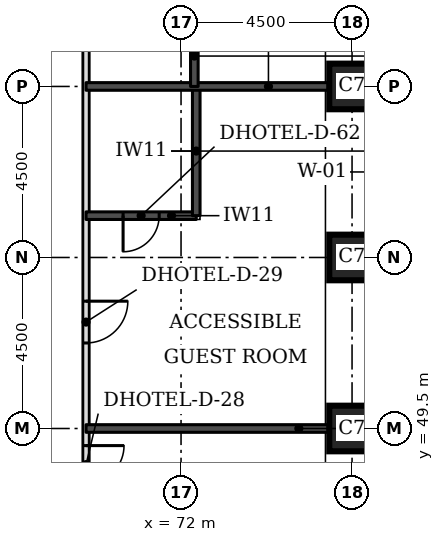
"""IFC4 building model, lengths in metres.
Left out: names, types, materials, properties, quantities, classifications, styles, units other than length and angle.
Written with IfcOpenShell. Run it as: python <this file> out.ifc"""

import sys

from ifc_helpers import new_model, si_unit, direction, frame, frame_2d, origin, origin_2d, place, context, subcontext, project, spatial, rectangle, extrude, element, fill, save


model = new_model("IFC4")
c1 = context("Model", 3, precision=1e-05, world=origin(), true_north=direction((0.0, 1.0)))
c2 = subcontext(c1, "Body", "Model", "MODEL_VIEW")
j1 = project(units=[si_unit("LENGTHUNIT", "METRE"), si_unit("PLANEANGLEUNIT", "RADIAN")], contexts=[c1])
p1 = place(None, origin())
s1 = spatial("IfcSite", under=j1, at=p1, CompositionType="ELEMENT")
p2 = place(p1, origin())
s2 = spatial("IfcBuilding", under=s1, at=p2, CompositionType="ELEMENT")
p3 = place(p2, frame((0.0, 0.0, 36.3)))
s3 = spatial("IfcBuildingStorey", under=s2, at=p3, CompositionType="ELEMENT", Elevation=36.3)
for number, where, z_axis, x_axis in (
    (1, (76.5, 49.5, 0.0), (0.0, 0.0, 1.0), (1.0, 0.0, 0.0)),
    (2, (76.5, 54.0, 0.0), (0.0, 0.0, 1.0), (1.0, 0.0, 0.0)),
    (3, (76.5, 58.5, 0.0), (0.0, 0.0, 1.0), (1.0, 0.0, 0.0)),
):
    element("IfcColumn", number, at=place(p3, frame(where, z_axis=z_axis, x_axis=x_axis)), inside=s3, PredefinedType="COLUMN", context=c2, shape_type="SweptSolid", body=[
        extrude(rectangle(XDim=1.2, YDim=1.2, at=origin_2d()), origin(), (0.0, 0.0, 1.0), 3.3),
    ])
p4 = place(p3, frame((69.5, 47.5, 0.0), z_axis=(0.0, 0.0, 1.0), x_axis=(0.0, 1.0, 0.0)))
e4 = element("IfcWall", 4, at=p4, inside=s3, PredefinedType="PARTITIONING", context=c2, shape_type="SweptSolid", body=[
    extrude(rectangle(XDim=26.5, YDim=0.15, at=frame_2d((13.25, 0.0))), origin(), (0.0, 0.0, 1.0), 3.08),
])
p5 = place(p4, frame((22.65, 0.0, 0.0)))
e5 = element("IfcOpeningElement", 5, at=p5, cuts=e4, PredefinedType="OPENING", context=c2, shape_type="SweptSolid", body=[
    extrude(rectangle(XDim=1.0, YDim=2.1, at=frame_2d((0.5, 1.05))), frame((0.0, 0.085, 0.0), z_axis=(0.0, -1.0, 0.0), x_axis=(1.0, 0.0, 0.0)), (0.0, 0.0, 1.0), 0.17),
])
p6 = place(p4, frame((16.6, 0.0, 0.0)))
e6 = element("IfcOpeningElement", 6, at=p6, cuts=e4, PredefinedType="OPENING", context=c2, shape_type="SweptSolid", body=[
    extrude(rectangle(XDim=1.0, YDim=2.1, at=frame_2d((0.5, 1.05))), frame((0.0, 0.085, 0.0), z_axis=(0.0, -1.0, 0.0), x_axis=(1.0, 0.0, 0.0)), (0.0, 0.0, 1.0), 0.17),
])
p7 = place(p4, frame((4.25, 0.0, 0.0)))
e7 = element("IfcOpeningElement", 7, at=p7, cuts=e4, PredefinedType="OPENING", context=c2, shape_type="SweptSolid", body=[
    extrude(rectangle(XDim=1.1, YDim=2.1, at=frame_2d((0.55, 1.05))), frame((0.0, 0.085, 0.0), z_axis=(0.0, -1.0, 0.0), x_axis=(1.0, 0.0, 0.0)), (0.0, 0.0, 1.0), 0.17),
])
p8 = place(p4, frame((0.55, 0.0, 0.0)))
e8 = element("IfcOpeningElement", 8, at=p8, cuts=e4, PredefinedType="OPENING", context=c2, shape_type="SweptSolid", body=[
    extrude(rectangle(XDim=1.0, YDim=2.1, at=frame_2d((0.5, 1.05))), frame((0.0, 0.085, 0.0), z_axis=(0.0, -1.0, 0.0), x_axis=(1.0, 0.0, 0.0)), (0.0, 0.0, 1.0), 0.17),
])
p9 = place(p3, frame((69.5, 49.5, 0.0), z_axis=(0.0, 0.0, 1.0), x_axis=(1.0, 0.0, 0.0)))
e9 = element("IfcWall", 9, at=p9, inside=s3, PredefinedType="SOLIDWALL", context=c2, shape_type="SweptSolid", body=[
    extrude(rectangle(XDim=6.4, YDim=0.2, at=frame_2d((3.2, 0.0))), origin(), (0.0, 0.0, 1.0), 3.08),
])
p10 = place(p3, frame((69.5, 55.1, 0.0), z_axis=(0.0, 0.0, 1.0), x_axis=(1.0, 0.0, 0.0)))
e10 = element("IfcWall", 10, at=p10, inside=s3, PredefinedType="SOLIDWALL", context=c2, shape_type="SweptSolid", body=[
    extrude(rectangle(XDim=2.9, YDim=0.2, at=frame_2d((1.45, 0.0))), origin(), (0.0, 0.0, 1.0), 3.08),
])
p11 = place(p10, frame((0.975, 0.0, 0.0)))
e11 = element("IfcOpeningElement", 11, at=p11, cuts=e10, PredefinedType="OPENING", context=c2, shape_type="SweptSolid", body=[
    extrude(rectangle(XDim=0.95, YDim=2.1, at=frame_2d((0.475, 1.05))), frame((0.0, 0.11, 0.0), z_axis=(0.0, -1.0, 0.0), x_axis=(1.0, 0.0, 0.0)), (0.0, 0.0, 1.0), 0.22),
])
p12 = place(p3, frame((72.4, 55.1, 0.0), z_axis=(0.0, 0.0, 1.0), x_axis=(0.0, 1.0, 0.0)))
e12 = element("IfcWall", 12, at=p12, inside=s3, PredefinedType="SOLIDWALL", context=c2, shape_type="SweptSolid", body=[
    extrude(rectangle(XDim=3.4, YDim=0.2, at=frame_2d((1.7, 0.0))), origin(), (0.0, 0.0, 1.0), 3.08),
])
p13 = place(p3, frame((69.5, 58.5, 0.0), z_axis=(0.0, 0.0, 1.0), x_axis=(1.0, 0.0, 0.0)))
e13 = element("IfcWall", 13, at=p13, inside=s3, PredefinedType="SOLIDWALL", context=c2, shape_type="SweptSolid", body=[
    extrude(rectangle(XDim=6.4, YDim=0.2, at=frame_2d((3.2, 0.0))), origin(), (0.0, 0.0, 1.0), 3.08),
])
p14 = place(p3, frame((72.35, 58.5, 0.0), z_axis=(0.0, 0.0, 1.0), x_axis=(0.0, 1.0, 0.0)))
e14 = element("IfcWall", 14, at=p14, inside=s3, PredefinedType="SOLIDWALL", context=c2, shape_type="SweptSolid", body=[
    extrude(rectangle(XDim=3.2, YDim=0.2, at=frame_2d((1.6, 0.0))), origin(), (0.0, 0.0, 1.0), 3.08),
])
p15 = place(p7, frame((1.1, 0.0, 0.0), z_axis=(0.0, 0.0, 1.0), x_axis=(-1.0, 0.0, 0.0)))
e15 = element("IfcDoor", 15, at=p15, inside=s3, OperationType="SINGLE_SWING_LEFT", PredefinedType="DOOR", context=c2, shape_type="SweptSolid", body=[
    extrude(rectangle(XDim=1.1, YDim=2.1, at=frame_2d((0.55, 1.05))), frame((0.0, 0.025, 0.0), z_axis=(0.0, -1.0, 0.0), x_axis=(1.0, 0.0, 0.0)), (0.0, 0.0, 1.0), 0.05),
])
fill(e7, e15)
p16 = place(p11, frame((0.95, 0.0, 0.0), z_axis=(0.0, 0.0, 1.0), x_axis=(-1.0, 0.0, 0.0)))
e16 = element("IfcDoor", 16, at=p16, inside=s3, OperationType="SINGLE_SWING_RIGHT", PredefinedType="DOOR", context=c2, shape_type="SweptSolid", body=[
    extrude(rectangle(XDim=0.95, YDim=2.1, at=frame_2d((0.475, 1.05))), frame((0.0, 0.025, 0.0), z_axis=(0.0, -1.0, 0.0), x_axis=(1.0, 0.0, 0.0)), (0.0, 0.0, 1.0), 0.05),
])
fill(e11, e16)
p17 = place(p8, frame((1.0, 0.0, 0.0), z_axis=(0.0, 0.0, 1.0), x_axis=(-1.0, 0.0, 0.0)))
e17 = element("IfcDoor", 17, at=p17, inside=s3, OperationType="SINGLE_SWING_LEFT", PredefinedType="DOOR", context=c2, shape_type="SweptSolid", body=[
    extrude(rectangle(XDim=1.0, YDim=2.1, at=frame_2d((0.5, 1.05))), frame((0.0, 0.025, 0.0), z_axis=(0.0, -1.0, 0.0), x_axis=(1.0, 0.0, 0.0)), (0.0, 0.0, 1.0), 0.05),
])
fill(e8, e17)
save(model, sys.argv[1])
